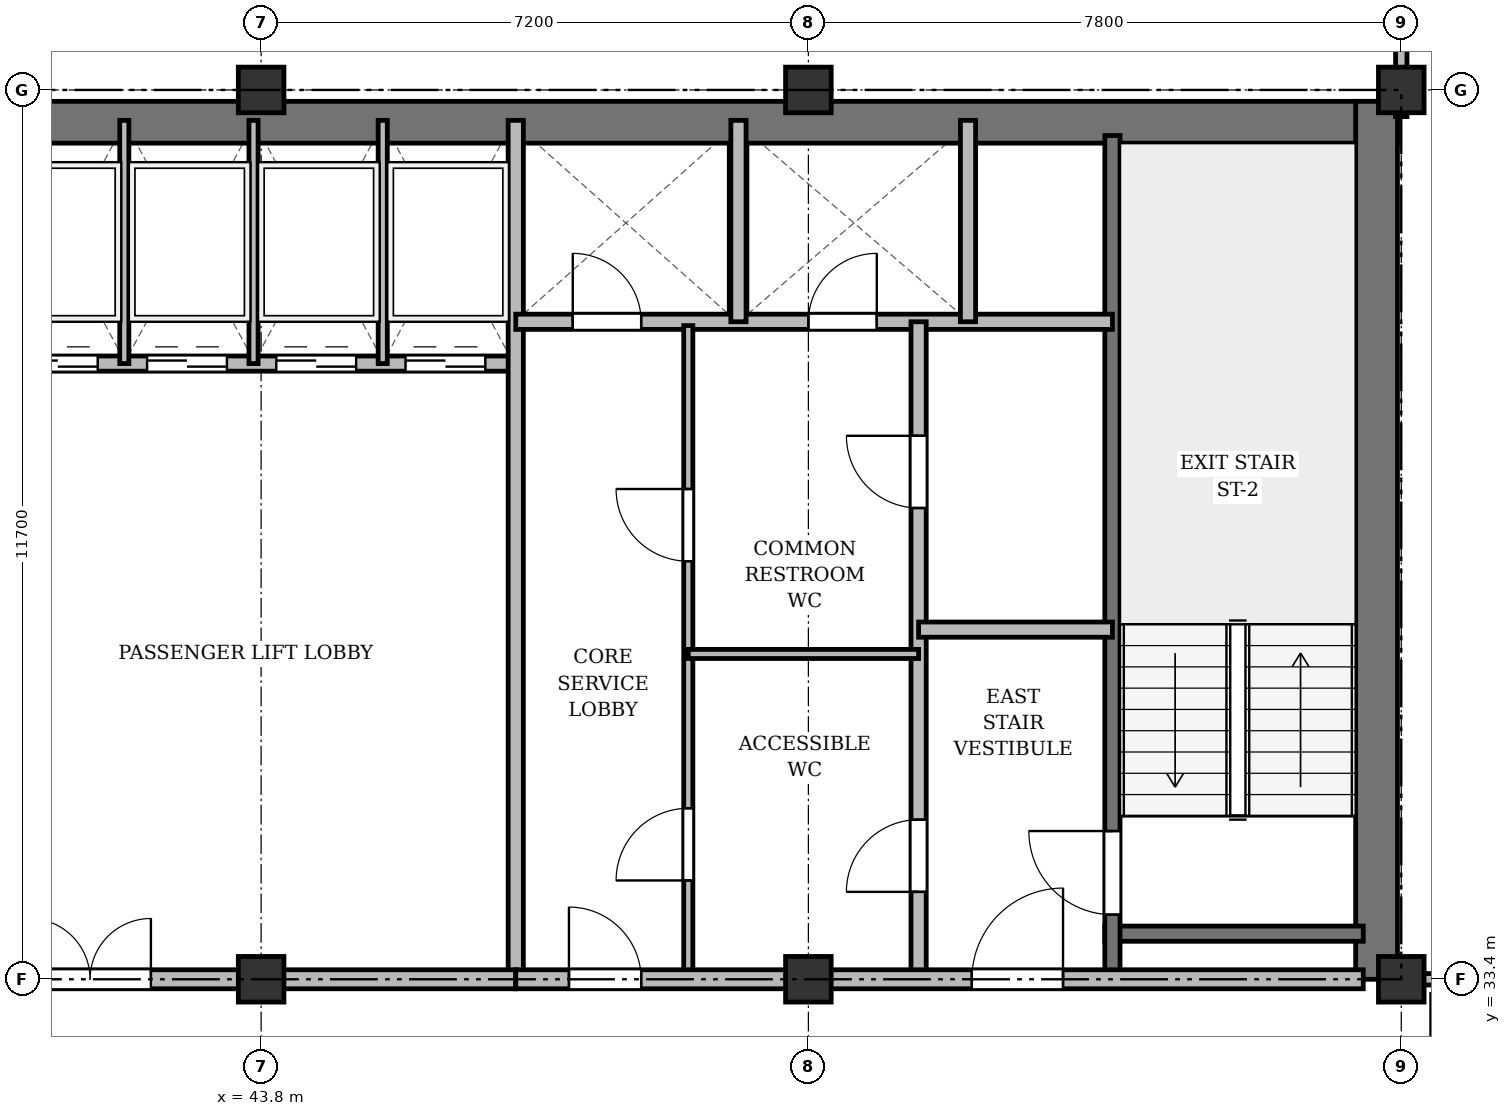
"""IFC4 building model, lengths in metres.
Left out: names, types, materials, properties, quantities, classifications, styles, units other than length and angle.
Written with IfcOpenShell. Run it as: python <this file> out.ifc"""

import sys

from ifc_helpers import new_model, si_unit, direction, frame, frame_2d, origin, origin_2d, place, context, subcontext, project, spatial, rectangle, extrude, source, transform, mapped, element, fill, save


model = new_model("IFC4")
c1 = context("Model", 3, precision=1e-05, world=origin(), true_north=direction((0.0, 1.0)))
c2 = subcontext(c1, "Body", "Model", "MODEL_VIEW")
j1 = project(units=[si_unit("LENGTHUNIT", "METRE"), si_unit("PLANEANGLEUNIT", "RADIAN")], contexts=[c1])
p1 = place(None, origin())
s1 = spatial("IfcSite", under=j1, at=p1, CompositionType="ELEMENT")
p2 = place(p1, origin())
s2 = spatial("IfcBuilding", under=s1, at=p2, CompositionType="ELEMENT")
p3 = place(p2, frame((0.0, 0.0, 295.5)))
s3 = spatial("IfcBuildingStorey", under=s2, at=p3, CompositionType="ELEMENT", Elevation=295.5)
m1 = source(origin(), c2, "Body", "SweptSolid", [
    extrude(rectangle(XDim=0.6, YDim=0.6, at=origin_2d()), origin(), (0.0, 0.0, 1.0), 3.6),
])
for number, where, z_axis, x_axis in (
    (1, (43.8, 33.4, 0.0), (0.0, 0.0, 1.0), (1.0, 0.0, 0.0)),
    (2, (43.8, 45.1, 0.0), (0.0, 0.0, 1.0), (1.0, 0.0, 0.0)),
    (3, (51.0, 33.4, 0.0), (0.0, 0.0, 1.0), (1.0, 0.0, 0.0)),
    (4, (51.0, 45.1, 0.0), (0.0, 0.0, 1.0), (1.0, 0.0, 0.0)),
    (5, (58.8, 33.4, 0.0), (0.0, 0.0, 1.0), (1.0, 0.0, 0.0)),
    (6, (58.8, 45.1, 0.0), (0.0, 0.0, 1.0), (1.0, 0.0, 0.0)),
):
    element("IfcColumn", number, at=place(p3, frame(where, z_axis=z_axis, x_axis=x_axis)), inside=s3, PredefinedType="COLUMN", context=c2, shape_type="MappedRepresentation", body=[
        mapped(m1, transform((0.0, 0.0, 0.0), x_axis=(1.0, 0.0, 0.0), y_axis=(0.0, 1.0, 0.0), z_axis=(0.0, 0.0, 1.0), scale=1.0)),
    ])
p4 = place(p3, frame((15.65, 44.675, 0.0), z_axis=(0.0, 0.0, 1.0), x_axis=(1.0, 0.0, 0.0)))
e7 = element("IfcWall", 7, at=p4, inside=s3, PredefinedType="SHEAR", context=c2, shape_type="SweptSolid", body=[
    extrude(rectangle(XDim=43.1, YDim=0.55, at=frame_2d((21.55, 0.0))), origin(), (0.0, 0.0, 1.0), 3.26),
])
p5 = place(p3, frame((58.475, 33.4, 0.0), z_axis=(0.0, 0.0, 1.0), x_axis=(0.0, 1.0, 0.0)))
e8 = element("IfcWall", 8, at=p5, inside=s3, PredefinedType="SHEAR", context=c2, shape_type="SweptSolid", body=[
    extrude(rectangle(XDim=11.55, YDim=0.55, at=frame_2d((5.775, 0.0))), origin(), (0.0, 0.0, 1.0), 3.26),
])
p6 = place(p3, frame((54.9, 34.0, 0.0), z_axis=(0.0, 0.0, 1.0), x_axis=(1.0, 0.0, 0.0)))
e9 = element("IfcWall", 9, at=p6, inside=s3, PredefinedType="SHEAR", context=c2, shape_type="SweptSolid", body=[
    extrude(rectangle(XDim=3.4, YDim=0.2, at=frame_2d((1.7, 0.0))), origin(), (0.0, 0.0, 1.0), 3.26),
])
p7 = place(p3, frame((55.0, 33.4, 0.0), z_axis=(0.0, 0.0, 1.0), x_axis=(0.0, 1.0, 0.0)))
e10 = element("IfcWall", 10, at=p7, inside=s3, PredefinedType="SHEAR", context=c2, shape_type="SweptSolid", body=[
    extrude(rectangle(XDim=11.1, YDim=0.2, at=frame_2d((5.55, 0.0))), origin(), (0.0, 0.0, 1.0), 3.26),
])
p8 = place(p7, frame((0.85, 0.0, 0.0)))
e11 = element("IfcOpeningElement", 11, at=p8, cuts=e10, PredefinedType="OPENING", context=c2, shape_type="SweptSolid", body=[
    extrude(rectangle(XDim=1.1, YDim=2.15, at=frame_2d((0.55, 1.075))), frame((0.0, 0.11, 0.0), z_axis=(0.0, -1.0, 0.0), x_axis=(1.0, 0.0, 0.0)), (0.0, 0.0, 1.0), 0.22),
])
p9 = place(p3, frame((40.25, 41.5, 0.0), z_axis=(0.0, 0.0, 1.0), x_axis=(1.0, 0.0, 0.0)))
e12 = element("IfcWall", 12, at=p9, inside=s3, PredefinedType="SOLIDWALL", context=c2, shape_type="SweptSolid", body=[
    extrude(rectangle(XDim=6.9, YDim=0.2, at=frame_2d((3.45, 0.0))), origin(), (0.0, 0.0, 1.0), 3.26),
])
p10 = place(p9, frame((0.35, 0.0, 0.0)))
e13 = element("IfcOpeningElement", 13, at=p10, cuts=e12, PredefinedType="OPENING", context=c2, shape_type="SweptSolid", body=[
    extrude(rectangle(XDim=1.05, YDim=2.15, at=frame_2d((0.525, 1.075))), frame((0.0, 0.11, 0.0), z_axis=(0.0, -1.0, 0.0), x_axis=(1.0, 0.0, 0.0)), (0.0, 0.0, 1.0), 0.22),
])
p11 = place(p9, frame((2.05, 0.0, 0.0)))
e14 = element("IfcOpeningElement", 14, at=p11, cuts=e12, PredefinedType="OPENING", context=c2, shape_type="SweptSolid", body=[
    extrude(rectangle(XDim=1.05, YDim=2.15, at=frame_2d((0.525, 1.075))), frame((0.0, 0.11, 0.0), z_axis=(0.0, -1.0, 0.0), x_axis=(1.0, 0.0, 0.0)), (0.0, 0.0, 1.0), 0.22),
])
p12 = place(p9, frame((3.75, 0.0, 0.0)))
e15 = element("IfcOpeningElement", 15, at=p12, cuts=e12, PredefinedType="OPENING", context=c2, shape_type="SweptSolid", body=[
    extrude(rectangle(XDim=1.05, YDim=2.15, at=frame_2d((0.525, 1.075))), frame((0.0, 0.11, 0.0), z_axis=(0.0, -1.0, 0.0), x_axis=(1.0, 0.0, 0.0)), (0.0, 0.0, 1.0), 0.22),
])
p13 = place(p9, frame((5.45, 0.0, 0.0)))
e16 = element("IfcOpeningElement", 16, at=p13, cuts=e12, PredefinedType="OPENING", context=c2, shape_type="SweptSolid", body=[
    extrude(rectangle(XDim=1.05, YDim=2.15, at=frame_2d((0.525, 1.075))), frame((0.0, 0.11, 0.0), z_axis=(0.0, -1.0, 0.0), x_axis=(1.0, 0.0, 0.0)), (0.0, 0.0, 1.0), 0.22),
])
for number, where, z_axis, x_axis in (
    (17, (42.0, 41.5, 0.0), (0.0, 0.0, 1.0), (0.0, 1.0, 0.0)),
    (18, (43.7, 41.5, 0.0), (0.0, 0.0, 1.0), (0.0, 1.0, 0.0)),
    (19, (45.4, 41.5, 0.0), (0.0, 0.0, 1.0), (0.0, 1.0, 0.0)),
):
    element("IfcWall", number, at=place(p3, frame(where, z_axis=z_axis, x_axis=x_axis)), inside=s3, PredefinedType="PARTITIONING", context=c2, shape_type="SweptSolid", body=[
        extrude(rectangle(XDim=3.2, YDim=0.12, at=frame_2d((1.6, 0.0))), origin(), (0.0, 0.0, 1.0), 3.26),
    ])
p14 = place(p3, frame((47.15, 33.4, 0.0), z_axis=(0.0, 0.0, 1.0), x_axis=(0.0, 1.0, 0.0)))
e20 = element("IfcWall", 20, at=p14, inside=s3, PredefinedType="SOLIDWALL", context=c2, shape_type="SweptSolid", body=[
    extrude(rectangle(XDim=11.3, YDim=0.2, at=frame_2d((5.65, 0.0))), origin(), (0.0, 0.0, 1.0), 2.81),
])
p15 = place(p3, frame((40.1, 33.4, 0.0), z_axis=(0.0, 0.0, 1.0), x_axis=(1.0, 0.0, 0.0)))
e21 = element("IfcWall", 21, at=p15, inside=s3, PredefinedType="PARTITIONING", context=c2, shape_type="SweptSolid", body=[
    extrude(rectangle(XDim=7.05, YDim=0.25, at=frame_2d((3.525, 0.0))), origin(), (0.0, 0.0, 1.0), 2.81),
])
p16 = place(p15, frame((0.65, 0.0, 0.0)))
e22 = element("IfcOpeningElement", 22, at=p16, cuts=e21, PredefinedType="OPENING", context=c2, shape_type="SweptSolid", body=[
    extrude(rectangle(XDim=1.6, YDim=2.2, at=frame_2d((0.8, 1.1))), frame((0.0, 0.135, 0.0), z_axis=(0.0, -1.0, 0.0), x_axis=(1.0, 0.0, 0.0)), (0.0, 0.0, 1.0), 0.27),
])
p17 = place(p3, frame((47.15, 42.05, 0.0), z_axis=(0.0, 0.0, 1.0), x_axis=(1.0, 0.0, 0.0)))
e23 = element("IfcWall", 23, at=p17, inside=s3, PredefinedType="SOLIDWALL", context=c2, shape_type="SweptSolid", body=[
    extrude(rectangle(XDim=7.85, YDim=0.2, at=frame_2d((3.925, 0.0))), origin(), (0.0, 0.0, 1.0), 2.76),
])
p18 = place(p17, frame((0.75, 0.0, 0.0)))
e24 = element("IfcOpeningElement", 24, at=p18, cuts=e23, PredefinedType="OPENING", context=c2, shape_type="SweptSolid", body=[
    extrude(rectangle(XDim=0.9, YDim=2.1, at=frame_2d((0.45, 1.05))), frame((0.0, 0.11, 0.0), z_axis=(0.0, -1.0, 0.0), x_axis=(1.0, 0.0, 0.0)), (0.0, 0.0, 1.0), 0.22),
])
p19 = place(p17, frame((3.85, 0.0, 0.0)))
e25 = element("IfcOpeningElement", 25, at=p19, cuts=e23, PredefinedType="OPENING", context=c2, shape_type="SweptSolid", body=[
    extrude(rectangle(XDim=0.9, YDim=2.1, at=frame_2d((0.45, 1.05))), frame((0.0, 0.11, 0.0), z_axis=(0.0, -1.0, 0.0), x_axis=(1.0, 0.0, 0.0)), (0.0, 0.0, 1.0), 0.22),
])
for number, where, z_axis, x_axis in (
    (26, (50.08, 42.05, 0.0), (0.0, 0.0, 1.0), (0.0, 1.0, 0.0)),
    (27, (53.1, 42.05, 0.0), (0.0, 0.0, 1.0), (0.0, 1.0, 0.0)),
):
    element("IfcWall", number, at=place(p3, frame(where, z_axis=z_axis, x_axis=x_axis)), inside=s3, PredefinedType="SOLIDWALL", context=c2, shape_type="SweptSolid", body=[
        extrude(rectangle(XDim=2.65, YDim=0.2, at=frame_2d((1.325, 0.0))), origin(), (0.0, 0.0, 1.0), 3.26),
    ])
p20 = place(p3, frame((52.45, 33.4, 0.0), z_axis=(0.0, 0.0, 1.0), x_axis=(0.0, 1.0, 0.0)))
e28 = element("IfcWall", 28, at=p20, inside=s3, PredefinedType="PARTITIONING", context=c2, shape_type="SweptSolid", body=[
    extrude(rectangle(XDim=8.65, YDim=0.2, at=frame_2d((4.325, 0.0))), origin(), (0.0, 0.0, 1.0), 2.81),
])
p21 = place(p20, frame((1.15, 0.0, 0.0)))
e29 = element("IfcOpeningElement", 29, at=p21, cuts=e28, PredefinedType="OPENING", context=c2, shape_type="SweptSolid", body=[
    extrude(rectangle(XDim=0.95, YDim=2.15, at=frame_2d((0.475, 1.075))), frame((0.0, 0.11, 0.0), z_axis=(0.0, -1.0, 0.0), x_axis=(1.0, 0.0, 0.0)), (0.0, 0.0, 1.0), 0.22),
])
p22 = place(p20, frame((6.2, 0.0, 0.0)))
e30 = element("IfcOpeningElement", 30, at=p22, cuts=e28, PredefinedType="OPENING", context=c2, shape_type="SweptSolid", body=[
    extrude(rectangle(XDim=0.95, YDim=2.15, at=frame_2d((0.475, 1.075))), frame((0.0, 0.11, 0.0), z_axis=(0.0, -1.0, 0.0), x_axis=(1.0, 0.0, 0.0)), (0.0, 0.0, 1.0), 0.22),
])
p23 = place(p3, frame((52.45, 38.0, 0.0), z_axis=(0.0, 0.0, 1.0), x_axis=(1.0, 0.0, 0.0)))
e31 = element("IfcWall", 31, at=p23, inside=s3, PredefinedType="PARTITIONING", context=c2, shape_type="SweptSolid", body=[
    extrude(rectangle(XDim=2.55, YDim=0.2, at=frame_2d((1.275, 0.0))), origin(), (0.0, 0.0, 1.0), 3.26),
])
p24 = place(p3, frame((49.42, 33.4, 0.0), z_axis=(0.0, 0.0, 1.0), x_axis=(0.0, 1.0, 0.0)))
e32 = element("IfcWall", 32, at=p24, inside=s3, PredefinedType="PARTITIONING", context=c2, shape_type="SweptSolid", body=[
    extrude(rectangle(XDim=8.6, YDim=0.12, at=frame_2d((4.3, 0.0))), origin(), (0.0, 0.0, 1.0), 2.81),
])
p25 = place(p24, frame((1.3, 0.0, 0.0)))
e33 = element("IfcOpeningElement", 33, at=p25, cuts=e32, PredefinedType="OPENING", context=c2, shape_type="SweptSolid", body=[
    extrude(rectangle(XDim=0.95, YDim=2.15, at=frame_2d((0.475, 1.075))), frame((0.0, 0.07, 0.0), z_axis=(0.0, -1.0, 0.0), x_axis=(1.0, 0.0, 0.0)), (0.0, 0.0, 1.0), 0.14),
])
p26 = place(p24, frame((5.5, 0.0, 0.0)))
e34 = element("IfcOpeningElement", 34, at=p26, cuts=e32, PredefinedType="OPENING", context=c2, shape_type="SweptSolid", body=[
    extrude(rectangle(XDim=0.95, YDim=2.15, at=frame_2d((0.475, 1.075))), frame((0.0, 0.07, 0.0), z_axis=(0.0, -1.0, 0.0), x_axis=(1.0, 0.0, 0.0)), (0.0, 0.0, 1.0), 0.14),
])
p27 = place(p3, frame((49.42, 37.68, 0.0), z_axis=(0.0, 0.0, 1.0), x_axis=(1.0, 0.0, 0.0)))
e35 = element("IfcWall", 35, at=p27, inside=s3, PredefinedType="PARTITIONING", context=c2, shape_type="SweptSolid", body=[
    extrude(rectangle(XDim=3.03, YDim=0.12, at=frame_2d((1.515, 0.0))), origin(), (0.0, 0.0, 1.0), 2.76),
])
p28 = place(p3, frame((47.15, 33.4, 0.0), z_axis=(0.0, 0.0, 1.0), x_axis=(1.0, 0.0, 0.0)))
e36 = element("IfcWall", 36, at=p28, inside=s3, PredefinedType="PARTITIONING", context=c2, shape_type="SweptSolid", body=[
    extrude(rectangle(XDim=11.15, YDim=0.25, at=frame_2d((5.575, 0.0))), origin(), (0.0, 0.0, 1.0), 2.81),
])
p29 = place(p28, frame((0.7, 0.0, 0.0)))
e37 = element("IfcOpeningElement", 37, at=p29, cuts=e36, PredefinedType="OPENING", context=c2, shape_type="SweptSolid", body=[
    extrude(rectangle(XDim=0.95, YDim=2.15, at=frame_2d((0.475, 1.075))), frame((0.0, 0.135, 0.0), z_axis=(0.0, -1.0, 0.0), x_axis=(1.0, 0.0, 0.0)), (0.0, 0.0, 1.0), 0.27),
])
p30 = place(p28, frame((6.0, 0.0, 0.0)))
e38 = element("IfcOpeningElement", 38, at=p30, cuts=e36, PredefinedType="OPENING", context=c2, shape_type="SweptSolid", body=[
    extrude(rectangle(XDim=1.2, YDim=2.15, at=frame_2d((0.6, 1.075))), frame((0.0, 0.135, 0.0), z_axis=(0.0, -1.0, 0.0), x_axis=(1.0, 0.0, 0.0)), (0.0, 0.0, 1.0), 0.27),
])
p31 = place(p3, frame((58.8, 33.4, 0.0), z_axis=(0.0, 0.0, 1.0), x_axis=(1.0, 0.0, 0.0)))
e39 = element("IfcWall", 39, at=p31, inside=s3, PredefinedType="PARTITIONING", context=c2, shape_type="SweptSolid", body=[
    extrude(rectangle(XDim=7.15, YDim=0.15, at=frame_2d((3.575, 0.0))), origin(), (0.0, 0.0, 1.0), 2.81),
])
p32 = place(p31, frame((4.25, 0.0, 0.0)))
e40 = element("IfcOpeningElement", 40, at=p32, cuts=e39, PredefinedType="OPENING", context=c2, shape_type="SweptSolid", body=[
    extrude(rectangle(XDim=0.95, YDim=2.15, at=frame_2d((0.475, 1.075))), frame((0.0, 0.085, 0.0), z_axis=(0.0, -1.0, 0.0), x_axis=(1.0, 0.0, 0.0)), (0.0, 0.0, 1.0), 0.17),
])
p33 = place(p3, frame((58.8, 44.75, 0.0), z_axis=(0.0, 0.0, 1.0), x_axis=(0.0, 1.0, 0.0)))
e41 = element("IfcWall", 41, at=p33, inside=s3, PredefinedType="PARTITIONING", context=c2, shape_type="SweptSolid", body=[
    extrude(rectangle(XDim=3.61, YDim=0.15, at=frame_2d((1.805, 0.0))), origin(), (0.0, 0.0, 1.0), 2.76),
])
p34 = place(p33, frame((1.1, 0.0, 0.0)))
e42 = element("IfcOpeningElement", 42, at=p34, cuts=e41, PredefinedType="OPENING", context=c2, shape_type="SweptSolid", body=[
    extrude(rectangle(XDim=0.95, YDim=2.15, at=frame_2d((0.475, 1.075))), frame((0.0, 0.085, 0.0), z_axis=(0.0, -1.0, 0.0), x_axis=(1.0, 0.0, 0.0)), (0.0, 0.0, 1.0), 0.17),
])
m2 = source(origin(), c2, "Body", "SweptSolid", [
    extrude(rectangle(XDim=1.1, YDim=2.15, at=frame_2d((0.55, 1.075))), frame((0.0, 0.025, 0.0), z_axis=(0.0, -1.0, 0.0), x_axis=(1.0, 0.0, 0.0)), (0.0, 0.0, 1.0), 0.05),
])
p35 = place(p8, origin())
e43 = element("IfcDoor", 43, at=p35, inside=s3, OperationType="SINGLE_SWING_RIGHT", PredefinedType="DOOR", context=c2, shape_type="MappedRepresentation", body=[
    mapped(m2, transform((0.0, 0.0, 0.0), x_axis=(1.0, 0.0, 0.0), y_axis=(0.0, 1.0, 0.0), z_axis=(0.0, 0.0, 1.0), scale=1.0)),
])
fill(e11, e43)
m3 = source(origin(), c2, "Body", "SweptSolid", [
    extrude(rectangle(XDim=1.05, YDim=2.15, at=frame_2d((0.525, 1.075))), frame((0.0, 0.025, 0.0), z_axis=(0.0, -1.0, 0.0), x_axis=(1.0, 0.0, 0.0)), (0.0, 0.0, 1.0), 0.05),
])
p36 = place(p10, origin())
e44 = element("IfcDoor", 44, at=p36, inside=s3, OperationType="DOUBLE_DOOR_SLIDING", PredefinedType="DOOR", context=c2, shape_type="MappedRepresentation", body=[
    mapped(m3, transform((0.0, 0.0, 0.0), x_axis=(1.0, 0.0, 0.0), y_axis=(0.0, 1.0, 0.0), z_axis=(0.0, 0.0, 1.0), scale=1.0)),
])
fill(e13, e44)
p37 = place(p11, origin())
e45 = element("IfcDoor", 45, at=p37, inside=s3, OperationType="DOUBLE_DOOR_SLIDING", PredefinedType="DOOR", context=c2, shape_type="MappedRepresentation", body=[
    mapped(m3, transform((0.0, 0.0, 0.0), x_axis=(1.0, 0.0, 0.0), y_axis=(0.0, 1.0, 0.0), z_axis=(0.0, 0.0, 1.0), scale=1.0)),
])
fill(e14, e45)
p38 = place(p12, origin())
e46 = element("IfcDoor", 46, at=p38, inside=s3, OperationType="DOUBLE_DOOR_SLIDING", PredefinedType="DOOR", context=c2, shape_type="MappedRepresentation", body=[
    mapped(m3, transform((0.0, 0.0, 0.0), x_axis=(1.0, 0.0, 0.0), y_axis=(0.0, 1.0, 0.0), z_axis=(0.0, 0.0, 1.0), scale=1.0)),
])
fill(e15, e46)
p39 = place(p13, origin())
e47 = element("IfcDoor", 47, at=p39, inside=s3, OperationType="DOUBLE_DOOR_SLIDING", PredefinedType="DOOR", context=c2, shape_type="MappedRepresentation", body=[
    mapped(m3, transform((0.0, 0.0, 0.0), x_axis=(1.0, 0.0, 0.0), y_axis=(0.0, 1.0, 0.0), z_axis=(0.0, 0.0, 1.0), scale=1.0)),
])
fill(e16, e47)
m4 = source(origin(), c2, "Body", "SweptSolid", [
    extrude(rectangle(XDim=1.6, YDim=2.2, at=frame_2d((0.8, 1.1))), frame((0.0, 0.025, 0.0), z_axis=(0.0, -1.0, 0.0), x_axis=(1.0, 0.0, 0.0)), (0.0, 0.0, 1.0), 0.05),
])
p40 = place(p16, origin())
e48 = element("IfcDoor", 48, at=p40, inside=s3, OperationType="DOUBLE_DOOR_SINGLE_SWING", PredefinedType="DOOR", context=c2, shape_type="MappedRepresentation", body=[
    mapped(m4, transform((0.0, 0.0, 0.0), x_axis=(1.0, 0.0, 0.0), y_axis=(0.0, 1.0, 0.0), z_axis=(0.0, 0.0, 1.0), scale=1.0)),
])
fill(e22, e48)
m5 = source(origin(), c2, "Body", "SweptSolid", [
    extrude(rectangle(XDim=0.9, YDim=2.1, at=frame_2d((0.45, 1.05))), frame((0.0, 0.025, 0.0), z_axis=(0.0, -1.0, 0.0), x_axis=(1.0, 0.0, 0.0)), (0.0, 0.0, 1.0), 0.05),
])
p41 = place(p18, origin())
e49 = element("IfcDoor", 49, at=p41, inside=s3, OperationType="SINGLE_SWING_LEFT", PredefinedType="DOOR", context=c2, shape_type="MappedRepresentation", body=[
    mapped(m5, transform((0.0, 0.0, 0.0), x_axis=(1.0, 0.0, 0.0), y_axis=(0.0, 1.0, 0.0), z_axis=(0.0, 0.0, 1.0), scale=1.0)),
])
fill(e24, e49)
p42 = place(p19, origin())
e50 = element("IfcDoor", 50, at=p42, inside=s3, OperationType="SINGLE_SWING_RIGHT", PredefinedType="DOOR", context=c2, shape_type="MappedRepresentation", body=[
    mapped(m5, transform((0.0, 0.0, 0.0), x_axis=(1.0, 0.0, 0.0), y_axis=(0.0, 1.0, 0.0), z_axis=(0.0, 0.0, 1.0), scale=1.0)),
])
fill(e25, e50)
m6 = source(origin(), c2, "Body", "SweptSolid", [
    extrude(rectangle(XDim=0.95, YDim=2.15, at=frame_2d((0.475, 1.075))), frame((0.0, 0.025, 0.0), z_axis=(0.0, -1.0, 0.0), x_axis=(1.0, 0.0, 0.0)), (0.0, 0.0, 1.0), 0.05),
])
p43 = place(p21, origin())
e51 = element("IfcDoor", 51, at=p43, inside=s3, OperationType="SINGLE_SWING_LEFT", PredefinedType="DOOR", context=c2, shape_type="MappedRepresentation", body=[
    mapped(m6, transform((0.0, 0.0, 0.0), x_axis=(1.0, 0.0, 0.0), y_axis=(0.0, 1.0, 0.0), z_axis=(0.0, 0.0, 1.0), scale=1.0)),
])
fill(e29, e51)
p44 = place(p22, origin())
e52 = element("IfcDoor", 52, at=p44, inside=s3, OperationType="SINGLE_SWING_RIGHT", PredefinedType="DOOR", context=c2, shape_type="MappedRepresentation", body=[
    mapped(m6, transform((0.0, 0.0, 0.0), x_axis=(1.0, 0.0, 0.0), y_axis=(0.0, 1.0, 0.0), z_axis=(0.0, 0.0, 1.0), scale=1.0)),
])
fill(e30, e52)
p45 = place(p25, origin())
e53 = element("IfcDoor", 53, at=p45, inside=s3, OperationType="SINGLE_SWING_LEFT", PredefinedType="DOOR", context=c2, shape_type="MappedRepresentation", body=[
    mapped(m6, transform((0.0, 0.0, 0.0), x_axis=(1.0, 0.0, 0.0), y_axis=(0.0, 1.0, 0.0), z_axis=(0.0, 0.0, 1.0), scale=1.0)),
])
fill(e33, e53)
p46 = place(p26, origin())
e54 = element("IfcDoor", 54, at=p46, inside=s3, OperationType="SINGLE_SWING_RIGHT", PredefinedType="DOOR", context=c2, shape_type="MappedRepresentation", body=[
    mapped(m6, transform((0.0, 0.0, 0.0), x_axis=(1.0, 0.0, 0.0), y_axis=(0.0, 1.0, 0.0), z_axis=(0.0, 0.0, 1.0), scale=1.0)),
])
fill(e34, e54)
p47 = place(p29, origin())
e55 = element("IfcDoor", 55, at=p47, inside=s3, OperationType="SINGLE_SWING_LEFT", PredefinedType="DOOR", context=c2, shape_type="MappedRepresentation", body=[
    mapped(m6, transform((0.0, 0.0, 0.0), x_axis=(1.0, 0.0, 0.0), y_axis=(0.0, 1.0, 0.0), z_axis=(0.0, 0.0, 1.0), scale=1.0)),
])
fill(e37, e55)
m7 = source(origin(), c2, "Body", "SweptSolid", [
    extrude(rectangle(XDim=1.2, YDim=2.15, at=frame_2d((0.6, 1.075))), frame((0.0, 0.025, 0.0), z_axis=(0.0, -1.0, 0.0), x_axis=(1.0, 0.0, 0.0)), (0.0, 0.0, 1.0), 0.05),
])
p48 = place(p30, origin())
e56 = element("IfcDoor", 56, at=p48, inside=s3, OperationType="SINGLE_SWING_RIGHT", PredefinedType="DOOR", context=c2, shape_type="MappedRepresentation", body=[
    mapped(m7, transform((0.0, 0.0, 0.0), x_axis=(1.0, 0.0, 0.0), y_axis=(0.0, 1.0, 0.0), z_axis=(0.0, 0.0, 1.0), scale=1.0)),
])
fill(e38, e56)
save(model, sys.argv[1])
